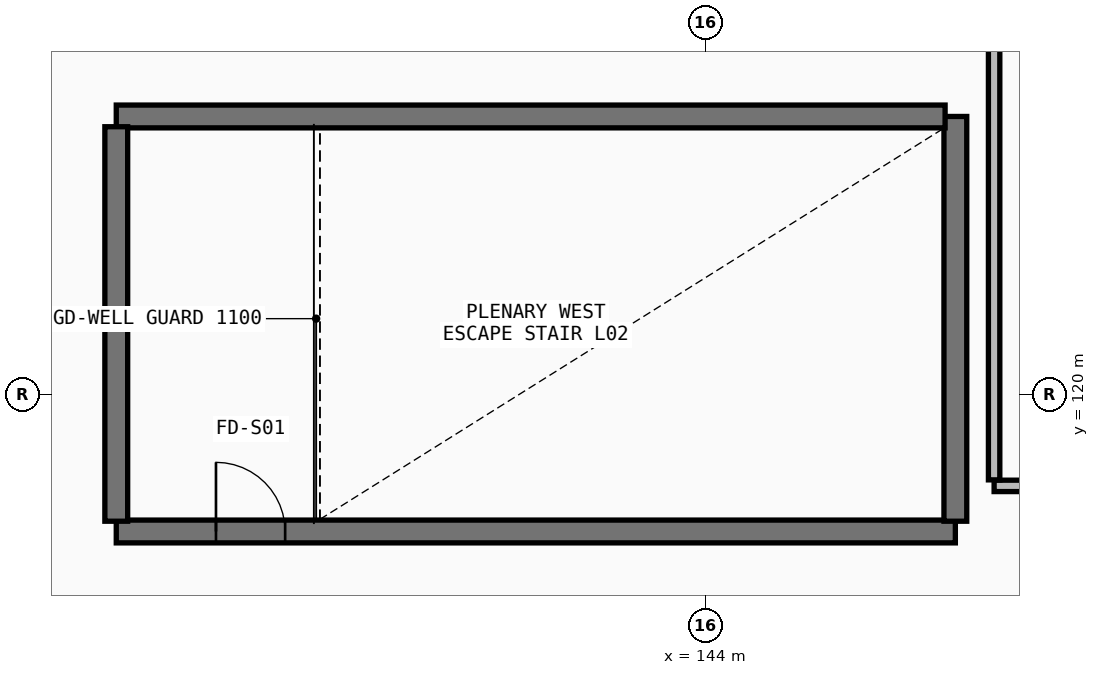
"""IFC4 building model, lengths in metres.
Left out: names, types, materials, properties, quantities, classifications, styles, units other than length and angle.
Written with IfcOpenShell. Run it as: python <this file> out.ifc"""

import sys

from ifc_helpers import new_model, si_unit, direction, frame, frame_2d, origin, place, context, subcontext, project, spatial, rectangle, extrude, element, fill, save


model = new_model("IFC4")
c1 = context("Model", 3, precision=1e-05, world=origin(), true_north=direction((0.0, 1.0)))
c2 = subcontext(c1, "Body", "Model", "MODEL_VIEW")
j1 = project(units=[si_unit("LENGTHUNIT", "METRE"), si_unit("PLANEANGLEUNIT", "RADIAN")], contexts=[c1])
p1 = place(None, origin())
s1 = spatial("IfcSite", under=j1, at=p1, CompositionType="ELEMENT")
p2 = place(p1, origin())
s2 = spatial("IfcBuilding", under=s1, at=p2, CompositionType="ELEMENT")
p3 = place(p2, frame((0.0, 0.0, 11.4)))
s3 = spatial("IfcBuildingStorey", under=s2, at=p3, CompositionType="ELEMENT", Elevation=11.4)
p4 = place(p3, frame((136.25, 118.2, 0.0), z_axis=(0.0, 0.0, 1.0), x_axis=(1.0, 0.0, 0.0)))
e1 = element("IfcWall", 1, at=p4, inside=s3, PredefinedType="SHEAR", context=c2, shape_type="SweptSolid", body=[
    extrude(rectangle(XDim=11.04, YDim=0.3, at=frame_2d((5.52, 0.0))), origin(), (0.0, 0.0, 1.0), 4.255),
])
p5 = place(p4, frame((1.312, 0.0, 0.0)))
e2 = element("IfcOpeningElement", 2, at=p5, cuts=e1, PredefinedType="OPENING", context=c2, shape_type="SweptSolid", body=[
    extrude(rectangle(XDim=0.91, YDim=2.08, at=frame_2d((0.455, 1.04))), frame((0.0, 0.16, 0.0), z_axis=(0.0, -1.0, 0.0), x_axis=(1.0, 0.0, 0.0)), (0.0, 0.0, 1.0), 0.32),
])
p6 = place(p3, frame((147.29, 118.335, 0.0), z_axis=(0.0, 0.0, 1.0), x_axis=(0.0, 1.0, 0.0)))
e3 = element("IfcWall", 3, at=p6, inside=s3, PredefinedType="SHEAR", context=c2, shape_type="SweptSolid", body=[
    extrude(rectangle(XDim=5.325, YDim=0.3, at=frame_2d((2.663, 0.0))), origin(), (0.0, 0.0, 1.0), 4.255),
])
p7 = place(p3, frame((147.155, 123.66, 0.0), z_axis=(0.0, 0.0, 1.0), x_axis=(-1.0, 0.0, 0.0)))
e4 = element("IfcWall", 4, at=p7, inside=s3, PredefinedType="SHEAR", context=c2, shape_type="SweptSolid", body=[
    extrude(rectangle(XDim=10.905, YDim=0.3, at=frame_2d((5.453, 0.0))), origin(), (0.0, 0.0, 1.0), 4.255),
])
p8 = place(p3, frame((136.25, 123.525, 0.0), z_axis=(0.0, 0.0, 1.0), x_axis=(0.0, -1.0, 0.0)))
e5 = element("IfcWall", 5, at=p8, inside=s3, PredefinedType="SHEAR", context=c2, shape_type="SweptSolid", body=[
    extrude(rectangle(XDim=5.19, YDim=0.3, at=frame_2d((2.595, 0.0))), origin(), (0.0, 0.0, 1.0), 4.255),
])
p9 = place(p3, frame((147.8, 118.8, 0.0), z_axis=(0.0, 0.0, 1.0), x_axis=(1.0, 0.0, 0.0)))
e6 = element("IfcWall", 6, at=p9, inside=s3, PredefinedType="PARTITIONING", context=c2, shape_type="SweptSolid", body=[
    extrude(rectangle(XDim=15.0, YDim=0.15, at=frame_2d((7.5, 0.0))), origin(), (0.0, 0.0, 1.0), 4.5),
])
p10 = place(p9, frame((7.75, 0.0, 0.0)))
e7 = element("IfcOpeningElement", 7, at=p10, cuts=e6, PredefinedType="OPENING", context=c2, shape_type="SweptSolid", body=[
    extrude(rectangle(XDim=0.91, YDim=2.08, at=frame_2d((0.455, 1.04))), frame((0.0, 0.085, 0.0), z_axis=(0.0, -1.0, 0.0), x_axis=(1.0, 0.0, 0.0)), (0.0, 0.0, 1.0), 0.17),
])
p11 = place(p3, frame((147.8, 125.78, 0.0), z_axis=(0.0, 0.0, 1.0), x_axis=(0.0, -1.0, 0.0)))
e8 = element("IfcWall", 8, at=p11, inside=s3, PredefinedType="PARTITIONING", context=c2, shape_type="SweptSolid", body=[
    extrude(rectangle(XDim=6.901, YDim=0.15, at=frame_2d((3.451, 0.0))), origin(), (0.0, 0.0, 1.0), 4.5),
])
p12 = place(p5, origin())
e9 = element("IfcDoor", 9, at=p12, inside=s3, OperationType="SINGLE_SWING_LEFT", PredefinedType="DOOR", context=c2, shape_type="SweptSolid", body=[
    extrude(rectangle(XDim=0.91, YDim=2.08, at=frame_2d((0.455, 1.04))), frame((0.0, 0.025, 0.0), z_axis=(0.0, -1.0, 0.0), x_axis=(1.0, 0.0, 0.0)), (0.0, 0.0, 1.0), 0.05),
])
fill(e2, e9)
save(model, sys.argv[1])
